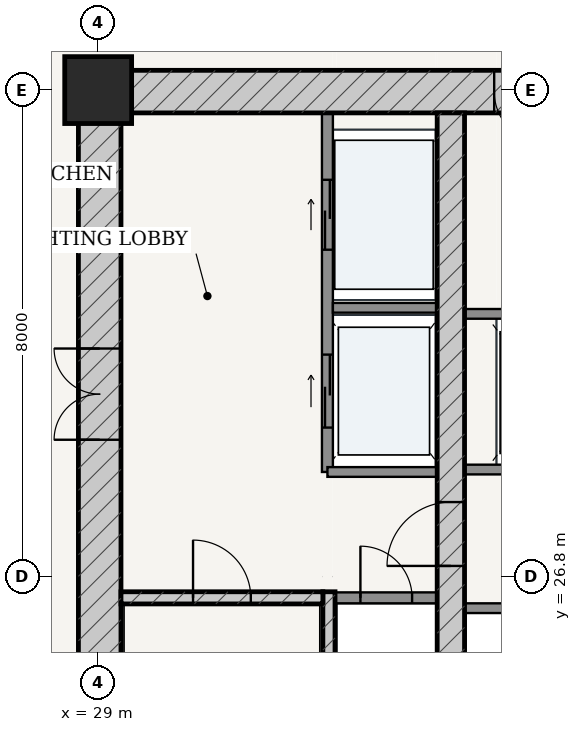
"""IFC4 building model, lengths in metres.
Left out: names, types, materials, properties, quantities, classifications, styles, units other than length and angle.
Written with IfcOpenShell. Run it as: python <this file> out.ifc"""

import sys

from ifc_helpers import new_model, si_unit, direction, frame, frame_2d, origin, origin_2d, place, context, subcontext, project, spatial, rectangle, extrude, source, transform, mapped, element, fill, save


model = new_model("IFC4")
c1 = context("Model", 3, precision=1e-05, world=origin(), true_north=direction((-0.2419218956, 0.970295726276)))
c2 = subcontext(c1, "Body", "Model", "MODEL_VIEW")
j1 = project(units=[si_unit("LENGTHUNIT", "METRE"), si_unit("PLANEANGLEUNIT", "RADIAN")], contexts=[c1])
p1 = place(None, origin())
s1 = spatial("IfcSite", under=j1, at=p1, CompositionType="ELEMENT")
p2 = place(p1, origin())
s2 = spatial("IfcBuilding", under=s1, at=p2, CompositionType="ELEMENT")
p3 = place(p2, frame((0.0, 0.0, 79.8)))
s3 = spatial("IfcBuildingStorey", under=s2, at=p3, CompositionType="ELEMENT", Elevation=79.8)
p4 = place(p3, frame((29.0, 34.8, 0.0), z_axis=(0.0, 0.0, 1.0), x_axis=(1.0, 0.0, 0.0)))
e1 = element("IfcColumn", 1, at=p4, inside=s3, PredefinedType="COLUMN", context=c2, shape_type="SweptSolid", body=[
    extrude(rectangle(XDim=1.1, YDim=1.1, at=origin_2d()), origin(), (0.0, 0.0, 1.0), 3.6),
])
p5 = place(p3, frame((28.675, 34.775, 0.0), z_axis=(0.0, 0.0, 1.0), x_axis=(1.0, 0.0, 0.0)))
e2 = element("IfcWall", 2, at=p5, inside=s3, PredefinedType="SHEAR", context=c2, shape_type="SweptSolid", body=[
    extrude(rectangle(XDim=18.65, YDim=0.7, at=frame_2d((9.325, 0.0))), origin(), (0.0, 0.0, 1.0), 3.325),
])
p6 = place(p5, frame((6.837, 0.0, 0.0)))
e3 = element("IfcOpeningElement", 3, at=p6, cuts=e2, PredefinedType="OPENING", context=c2, shape_type="SweptSolid", body=[
    extrude(rectangle(XDim=0.85, YDim=2.1, at=frame_2d((0.425, 1.05))), frame((0.0, 0.36, 0.0), z_axis=(0.0, -1.0, 0.0), x_axis=(1.0, 0.0, 0.0)), (0.0, 0.0, 1.0), 0.72),
])
p7 = place(p5, frame((8.895, 0.0, 0.0)))
e4 = element("IfcOpeningElement", 4, at=p7, cuts=e2, PredefinedType="OPENING", context=c2, shape_type="SweptSolid", body=[
    extrude(rectangle(XDim=0.86, YDim=2.1, at=frame_2d((0.43, 1.05))), frame((0.0, 0.36, 0.0), z_axis=(0.0, -1.0, 0.0), x_axis=(1.0, 0.0, 0.0)), (0.0, 0.0, 1.0), 0.72),
])
p8 = place(p5, frame((10.962, 0.0, 0.0)))
e5 = element("IfcOpeningElement", 5, at=p8, cuts=e2, PredefinedType="OPENING", context=c2, shape_type="SweptSolid", body=[
    extrude(rectangle(XDim=0.85, YDim=2.1, at=frame_2d((0.425, 1.05))), frame((0.0, 0.36, 0.0), z_axis=(0.0, -1.0, 0.0), x_axis=(1.0, 0.0, 0.0)), (0.0, 0.0, 1.0), 0.72),
])
p9 = place(p3, frame((29.025, 19.175, 0.0), z_axis=(0.0, 0.0, 1.0), x_axis=(0.0, 1.0, 0.0)))
e6 = element("IfcWall", 6, at=p9, inside=s3, PredefinedType="SHEAR", context=c2, shape_type="SweptSolid", body=[
    extrude(rectangle(XDim=15.25, YDim=0.7, at=frame_2d((7.625, 0.0))), origin(), (0.0, 0.0, 1.0), 3.325),
])
p10 = place(p9, frame((9.875, 0.0, 0.0)))
e7 = element("IfcOpeningElement", 7, at=p10, cuts=e6, PredefinedType="OPENING", context=c2, shape_type="SweptSolid", body=[
    extrude(rectangle(XDim=1.5, YDim=2.2, at=frame_2d((0.75, 1.1))), frame((0.0, 0.36, 0.0), z_axis=(0.0, -1.0, 0.0), x_axis=(1.0, 0.0, 0.0)), (0.0, 0.0, 1.0), 0.72),
])
p11 = place(p3, frame((32.795, 19.175, 0.0), z_axis=(0.0, 0.0, 1.0), x_axis=(0.0, 1.0, 0.0)))
e8 = element("IfcWall", 8, at=p11, inside=s3, PredefinedType="SOLIDWALL", context=c2, shape_type="SweptSolid", body=[
    extrude(rectangle(XDim=7.375, YDim=0.2, at=frame_2d((3.688, 0.0))), origin(), (0.0, 0.0, 1.0), 3.325),
])
p12 = place(p3, frame((29.375, 26.45, 0.0), z_axis=(0.0, 0.0, 1.0), x_axis=(1.0, 0.0, 0.0)))
e9 = element("IfcWall", 9, at=p12, inside=s3, PredefinedType="SOLIDWALL", context=c2, shape_type="SweptSolid", body=[
    extrude(rectangle(XDim=3.32, YDim=0.2, at=frame_2d((1.66, 0.0))), origin(), (0.0, 0.0, 1.0), 3.325),
])
p13 = place(p12, frame((1.185, 0.0, 0.0)))
e10 = element("IfcOpeningElement", 10, at=p13, cuts=e9, PredefinedType="OPENING", context=c2, shape_type="SweptSolid", body=[
    extrude(rectangle(XDim=0.95, YDim=2.15, at=frame_2d((0.475, 1.075))), frame((0.0, 0.11, 0.0), z_axis=(0.0, -1.0, 0.0), x_axis=(1.0, 0.0, 0.0)), (0.0, 0.0, 1.0), 0.22),
])
p14 = place(p3, frame((34.8, 19.175, 0.0), z_axis=(0.0, 0.0, 1.0), x_axis=(0.0, 1.0, 0.0)))
e11 = element("IfcWall", 11, at=p14, inside=s3, PredefinedType="SHEAR", context=c2, shape_type="SweptSolid", body=[
    extrude(rectangle(XDim=15.25, YDim=0.45, at=frame_2d((7.625, 0.0))), origin(), (0.0, 0.0, 1.0), 3.325),
])
p15 = place(p14, frame((7.8, 0.0, 0.0)))
e12 = element("IfcOpeningElement", 12, at=p15, cuts=e11, PredefinedType="OPENING", context=c2, shape_type="SweptSolid", body=[
    extrude(rectangle(XDim=1.05, YDim=2.15, at=frame_2d((0.525, 1.075))), frame((0.0, 0.235, 0.0), z_axis=(0.0, -1.0, 0.0), x_axis=(1.0, 0.0, 0.0)), (0.0, 0.0, 1.0), 0.47),
])
p16 = place(p3, frame((32.9, 26.45, 0.0), z_axis=(0.0, 0.0, 1.0), x_axis=(1.0, 0.0, 0.0)))
e13 = element("IfcWall", 13, at=p16, inside=s3, PredefinedType="PARTITIONING", context=c2, shape_type="SweptSolid", body=[
    extrude(rectangle(XDim=1.675, YDim=0.18, at=frame_2d((0.837, 0.0))), origin(), (0.0, 0.0, 1.0), 3.325),
])
p17 = place(p16, frame((0.413, 0.0, 0.0)))
e14 = element("IfcOpeningElement", 14, at=p17, cuts=e13, PredefinedType="OPENING", context=c2, shape_type="SweptSolid", body=[
    extrude(rectangle(XDim=0.85, YDim=2.1, at=frame_2d((0.425, 1.05))), frame((0.0, 0.1, 0.0), z_axis=(0.0, -1.0, 0.0), x_axis=(1.0, 0.0, 0.0)), (0.0, 0.0, 1.0), 0.2),
])
p18 = place(p3, frame((32.77, 28.52, 0.0), z_axis=(0.0, 0.0, 1.0), x_axis=(0.0, 1.0, 0.0)))
e15 = element("IfcWall", 15, at=p18, inside=s3, PredefinedType="PARTITIONING", context=c2, shape_type="SweptSolid", body=[
    extrude(rectangle(XDim=5.905, YDim=0.18, at=frame_2d((2.953, 0.0))), origin(), (0.0, 0.0, 1.0), 3.325),
])
p19 = place(p18, frame((3.655, 0.0, 0.0)))
e16 = element("IfcOpeningElement", 16, at=p19, cuts=e15, PredefinedType="OPENING", context=c2, shape_type="SweptSolid", body=[
    extrude(rectangle(XDim=1.15, YDim=2.2, at=frame_2d((0.575, 1.1))), frame((0.0, 0.1, 0.0), z_axis=(0.0, -1.0, 0.0), x_axis=(1.0, 0.0, 0.0)), (0.0, 0.0, 1.0), 0.2),
])
p20 = place(p18, frame((0.73, 0.0, 0.0)))
e17 = element("IfcOpeningElement", 17, at=p20, cuts=e15, PredefinedType="OPENING", context=c2, shape_type="SweptSolid", body=[
    extrude(rectangle(XDim=1.2, YDim=2.25, at=frame_2d((0.6, 1.125))), frame((0.0, 0.1, 0.0), z_axis=(0.0, -1.0, 0.0), x_axis=(1.0, 0.0, 0.0)), (0.0, 0.0, 1.0), 0.2),
])
p21 = place(p3, frame((32.86, 31.22, 0.0), z_axis=(0.0, 0.0, 1.0), x_axis=(1.0, 0.0, 0.0)))
e18 = element("IfcWall", 18, at=p21, inside=s3, PredefinedType="PARTITIONING", context=c2, shape_type="SweptSolid", body=[
    extrude(rectangle(XDim=1.715, YDim=0.16, at=frame_2d((0.857, 0.0))), origin(), (0.0, 0.0, 1.0), 3.325),
])
p22 = place(p3, frame((32.77, 28.52, 0.0), z_axis=(0.0, 0.0, 1.0), x_axis=(1.0, 0.0, 0.0)))
e19 = element("IfcWall", 19, at=p22, inside=s3, PredefinedType="PARTITIONING", context=c2, shape_type="SweptSolid", body=[
    extrude(rectangle(XDim=1.805, YDim=0.16, at=frame_2d((0.902, 0.0))), origin(), (0.0, 0.0, 1.0), 3.325),
])
p23 = place(p3, frame((35.025, 28.56, 0.0), z_axis=(0.0, 0.0, 1.0), x_axis=(1.0, 0.0, 0.0)))
e20 = element("IfcWall", 20, at=p23, inside=s3, PredefinedType="PARTITIONING", context=c2, shape_type="SweptSolid", body=[
    extrude(rectangle(XDim=5.95, YDim=0.16, at=frame_2d((2.975, 0.0))), origin(), (0.0, 0.0, 1.0), 3.325),
])
p24 = place(p23, frame((0.76, 0.0, 0.0)))
e21 = element("IfcOpeningElement", 21, at=p24, cuts=e20, PredefinedType="OPENING", context=c2, shape_type="SweptSolid", body=[
    extrude(rectangle(XDim=1.1, YDim=2.2, at=frame_2d((0.55, 1.1))), frame((0.0, 0.09, 0.0), z_axis=(0.0, -1.0, 0.0), x_axis=(1.0, 0.0, 0.0)), (0.0, 0.0, 1.0), 0.18),
])
p25 = place(p23, frame((2.425, 0.0, 0.0)))
e22 = element("IfcOpeningElement", 22, at=p25, cuts=e20, PredefinedType="OPENING", context=c2, shape_type="SweptSolid", body=[
    extrude(rectangle(XDim=1.1, YDim=2.2, at=frame_2d((0.55, 1.1))), frame((0.0, 0.09, 0.0), z_axis=(0.0, -1.0, 0.0), x_axis=(1.0, 0.0, 0.0)), (0.0, 0.0, 1.0), 0.18),
])
p26 = place(p23, frame((4.09, 0.0, 0.0)))
e23 = element("IfcOpeningElement", 23, at=p26, cuts=e20, PredefinedType="OPENING", context=c2, shape_type="SweptSolid", body=[
    extrude(rectangle(XDim=1.1, YDim=2.2, at=frame_2d((0.55, 1.1))), frame((0.0, 0.09, 0.0), z_axis=(0.0, -1.0, 0.0), x_axis=(1.0, 0.0, 0.0)), (0.0, 0.0, 1.0), 0.18),
])
for number, where, z_axis, x_axis in (
    (24, (35.025, 31.12, 0.0), (0.0, 0.0, 1.0), (1.0, 0.0, 0.0)),
    (25, (35.025, 26.28, 0.0), (0.0, 0.0, 1.0), (1.0, 0.0, 0.0)),
):
    element("IfcWall", number, at=place(p3, frame(where, z_axis=z_axis, x_axis=x_axis)), inside=s3, PredefinedType="PARTITIONING", context=c2, shape_type="SweptSolid", body=[
        extrude(rectangle(XDim=5.95, YDim=0.16, at=frame_2d((2.975, 0.0))), origin(), (0.0, 0.0, 1.0), 3.325),
    ])
m1 = source(origin(), c2, "Body", "SweptSolid", [
    extrude(rectangle(XDim=1.5, YDim=2.2, at=frame_2d((0.75, 1.1))), frame((0.0, 0.025, 0.0), z_axis=(0.0, -1.0, 0.0), x_axis=(1.0, 0.0, 0.0)), (0.0, 0.0, 1.0), 0.05),
])
p27 = place(p10, origin())
e26 = element("IfcDoor", 26, at=p27, inside=s3, OperationType="DOUBLE_DOOR_SINGLE_SWING", PredefinedType="DOOR", context=c2, shape_type="MappedRepresentation", body=[
    mapped(m1, transform((0.0, 0.0, 0.0), scale=1.0)),
])
fill(e7, e26)
m2 = source(origin(), c2, "Body", "SweptSolid", [
    extrude(rectangle(XDim=1.05, YDim=2.15, at=frame_2d((0.525, 1.075))), frame((0.0, 0.025, 0.0), z_axis=(0.0, -1.0, 0.0), x_axis=(1.0, 0.0, 0.0)), (0.0, 0.0, 1.0), 0.05),
])
p28 = place(p15, origin())
e27 = element("IfcDoor", 27, at=p28, inside=s3, OperationType="SINGLE_SWING_LEFT", PredefinedType="DOOR", context=c2, shape_type="MappedRepresentation", body=[
    mapped(m2, transform((0.0, 0.0, 0.0), scale=1.0)),
])
fill(e12, e27)
m3 = source(origin(), c2, "Body", "SweptSolid", [
    extrude(rectangle(XDim=0.95, YDim=2.15, at=frame_2d((0.475, 1.075))), frame((0.0, 0.025, 0.0), z_axis=(0.0, -1.0, 0.0), x_axis=(1.0, 0.0, 0.0)), (0.0, 0.0, 1.0), 0.05),
])
p29 = place(p13, origin())
e28 = element("IfcDoor", 28, at=p29, inside=s3, OperationType="SINGLE_SWING_LEFT", PredefinedType="DOOR", context=c2, shape_type="MappedRepresentation", body=[
    mapped(m3, transform((0.0, 0.0, 0.0), scale=1.0)),
])
fill(e10, e28)
m4 = source(origin(), c2, "Body", "SweptSolid", [
    extrude(rectangle(XDim=0.85, YDim=2.1, at=frame_2d((0.425, 1.05))), frame((0.0, 0.025, 0.0), z_axis=(0.0, -1.0, 0.0), x_axis=(1.0, 0.0, 0.0)), (0.0, 0.0, 1.0), 0.05),
])
p30 = place(p17, origin())
e29 = element("IfcDoor", 29, at=p30, inside=s3, OperationType="SINGLE_SWING_LEFT", PredefinedType="DOOR", context=c2, shape_type="MappedRepresentation", body=[
    mapped(m4, transform((0.0, 0.0, 0.0), scale=1.0)),
])
fill(e14, e29)
p31 = place(p6, frame((0.85, 0.0, 0.0), z_axis=(0.0, 0.0, 1.0), x_axis=(-1.0, 0.0, 0.0)))
e30 = element("IfcDoor", 30, at=p31, inside=s3, OperationType="SINGLE_SWING_LEFT", PredefinedType="DOOR", context=c2, shape_type="MappedRepresentation", body=[
    mapped(m4, transform((0.0, 0.0, 0.0), scale=1.0)),
])
fill(e3, e30)
m5 = source(origin(), c2, "Body", "SweptSolid", [
    extrude(rectangle(XDim=1.15, YDim=2.2, at=frame_2d((0.575, 1.1))), frame((0.0, 0.025, 0.0), z_axis=(0.0, -1.0, 0.0), x_axis=(1.0, 0.0, 0.0)), (0.0, 0.0, 1.0), 0.05),
])
p32 = place(p19, origin())
e31 = element("IfcDoor", 31, at=p32, inside=s3, OperationType="DOUBLE_DOOR_SLIDING", PredefinedType="DOOR", context=c2, shape_type="MappedRepresentation", body=[
    mapped(m5, transform((0.0, 0.0, 0.0), scale=1.0)),
])
fill(e16, e31)
m6 = source(origin(), c2, "Body", "SweptSolid", [
    extrude(rectangle(XDim=1.2, YDim=2.25, at=frame_2d((0.6, 1.125))), frame((0.0, 0.025, 0.0), z_axis=(0.0, -1.0, 0.0), x_axis=(1.0, 0.0, 0.0)), (0.0, 0.0, 1.0), 0.05),
])
p33 = place(p20, origin())
e32 = element("IfcDoor", 32, at=p33, inside=s3, OperationType="DOUBLE_DOOR_SLIDING", PredefinedType="DOOR", context=c2, shape_type="MappedRepresentation", body=[
    mapped(m6, transform((0.0, 0.0, 0.0), scale=1.0)),
])
fill(e17, e32)
save(model, sys.argv[1])
